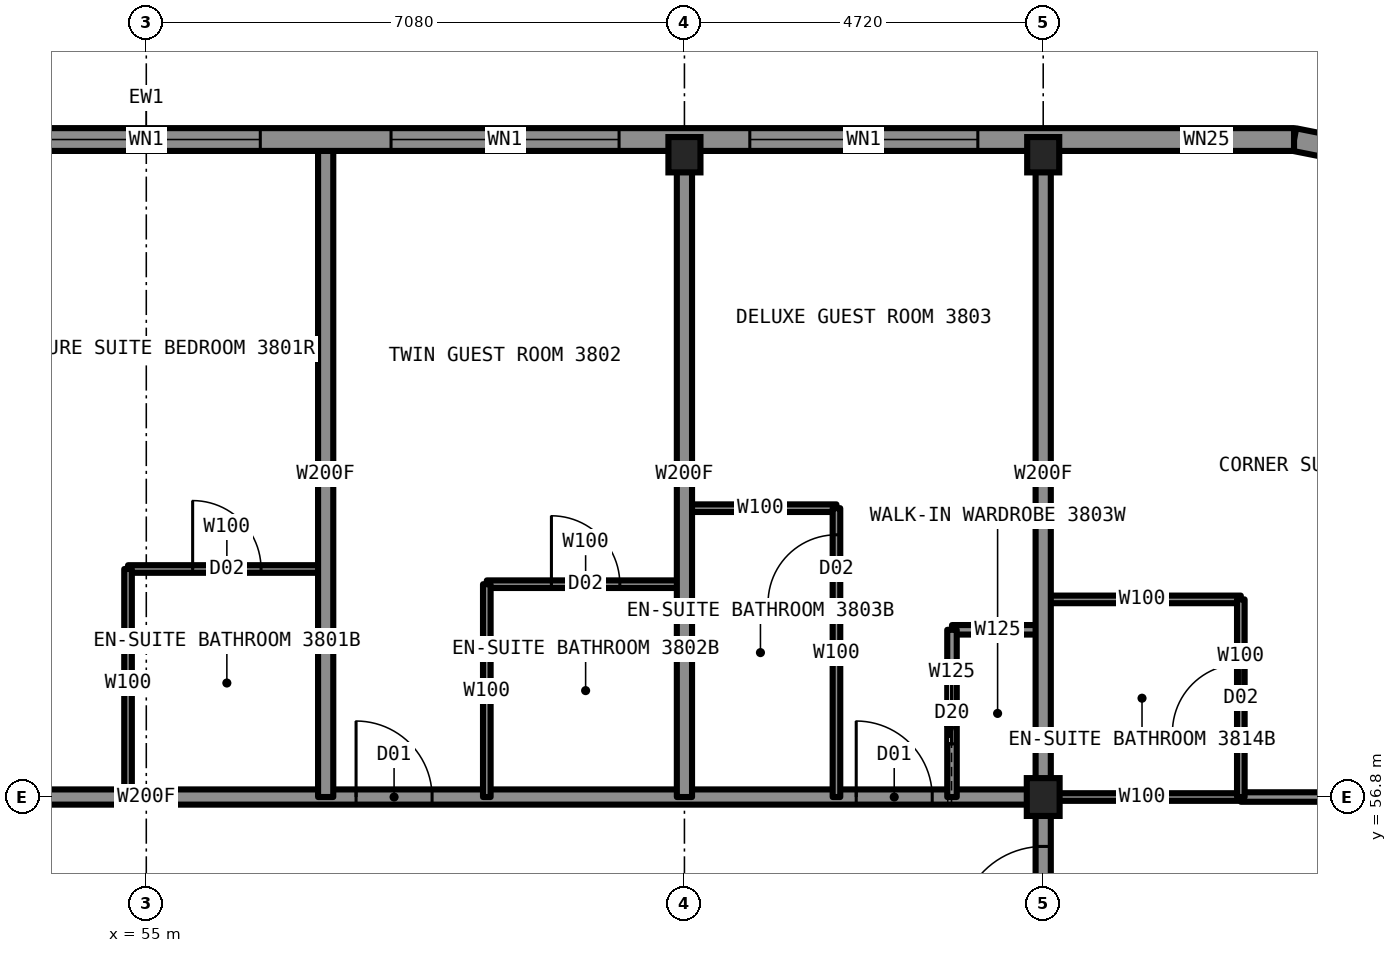
"""IFC4 building model, lengths in metres.
Left out: names, types, materials, properties, quantities, classifications, styles, units other than length and angle.
Written with IfcOpenShell. Run it as: python <this file> out.ifc"""

import sys

from ifc_helpers import new_model, si_unit, direction, frame, frame_2d, origin, origin_2d, place, context, subcontext, project, spatial, rectangle, i_section, extrude, element, fill, save


model = new_model("IFC4")
c1 = context("Model", 3, precision=1e-05, world=origin(), true_north=direction((0.0, 1.0)))
c2 = subcontext(c1, "Body", "Model", "MODEL_VIEW")
j1 = project(units=[si_unit("LENGTHUNIT", "METRE"), si_unit("PLANEANGLEUNIT", "RADIAN")], contexts=[c1])
p1 = place(None, origin())
s1 = spatial("IfcSite", under=j1, at=p1, CompositionType="ELEMENT")
p2 = place(p1, origin())
s2 = spatial("IfcBuilding", under=s1, at=p2, CompositionType="ELEMENT")
p3 = place(p2, frame((0.0, 0.0, 135.4)))
s3 = spatial("IfcBuildingStorey", under=s2, at=p3, CompositionType="ELEMENT", Elevation=135.4)
for number, where, z_axis, x_axis in (
    (1, (62.08, 65.25, 0.0), (0.0, 0.0, 1.0), (1.0, 0.0, 0.0)),
    (2, (66.8, 65.25, 0.0), (0.0, 0.0, 1.0), (1.0, 0.0, 0.0)),
):
    element("IfcColumn", number, at=place(p3, frame(where, z_axis=z_axis, x_axis=x_axis)), inside=s3, PredefinedType="COLUMN", context=c2, shape_type="SweptSolid", body=[
        extrude(i_section(OverallWidth=0.422, OverallDepth=0.465, WebThickness=0.045, FlangeThickness=0.073, at=origin_2d()), origin(), (0.0, 0.0, 1.0), 3.5),
    ])
p4 = place(p3, frame((66.8, 56.8, 0.0), z_axis=(0.0, 0.0, 1.0), x_axis=(1.0, 0.0, 0.0)))
e3 = element("IfcColumn", 3, at=p4, inside=s3, PredefinedType="COLUMN", context=c2, shape_type="SweptSolid", body=[
    extrude(i_section(OverallWidth=0.432, OverallDepth=0.498, WebThickness=0.056, FlangeThickness=0.089, at=origin_2d()), origin(), (0.0, 0.0, 1.0), 3.5),
])
p5 = place(p3, frame((66.8, 56.8, 0.0), z_axis=(0.0, 0.0, 1.0), x_axis=(1.0, 0.0, 0.0)))
e4 = element("IfcWall", 4, at=p5, inside=s3, PredefinedType="PARTITIONING", context=c2, shape_type="SweptSolid", body=[
    extrude(rectangle(XDim=2.6, YDim=0.1, at=frame_2d((1.3, 0.0))), origin(), (0.0, 0.0, 1.0), 2.573),
])
p6 = place(p3, frame((43.2, 56.8, 0.0), z_axis=(0.0, 0.0, 1.0), x_axis=(1.0, 0.0, 0.0)))
e5 = element("IfcWall", 5, at=p6, inside=s3, PredefinedType="PARTITIONING", context=c2, shape_type="SweptSolid", body=[
    extrude(rectangle(XDim=23.6, YDim=0.2, at=frame_2d((11.8, 0.0))), origin(), (0.0, 0.0, 1.0), 3.33),
])
p7 = place(p6, frame((1.85, 0.0, 0.0)))
e6 = element("IfcOpeningElement", 6, at=p7, cuts=e5, PredefinedType="OPENING", context=c2, shape_type="SweptSolid", body=[
    extrude(rectangle(XDim=1.1, YDim=2.2, at=frame_2d((0.55, 1.1))), frame((0.0, 0.11, 0.0), z_axis=(0.0, -1.0, 0.0), x_axis=(1.0, 0.0, 0.0)), (0.0, 0.0, 1.0), 0.22),
])
p8 = place(p6, frame((14.56, 0.0, 0.0)))
e7 = element("IfcOpeningElement", 7, at=p8, cuts=e5, PredefinedType="OPENING", context=c2, shape_type="SweptSolid", body=[
    extrude(rectangle(XDim=1.0, YDim=2.2, at=frame_2d((0.5, 1.1))), frame((0.0, 0.11, 0.0), z_axis=(0.0, -1.0, 0.0), x_axis=(1.0, 0.0, 0.0)), (0.0, 0.0, 1.0), 0.22),
])
p9 = place(p6, frame((21.14, 0.0, 0.0)))
e8 = element("IfcOpeningElement", 8, at=p9, cuts=e5, PredefinedType="OPENING", context=c2, shape_type="SweptSolid", body=[
    extrude(rectangle(XDim=1.0, YDim=2.2, at=frame_2d((0.5, 1.1))), frame((0.0, 0.11, 0.0), z_axis=(0.0, -1.0, 0.0), x_axis=(1.0, 0.0, 0.0)), (0.0, 0.0, 1.0), 0.22),
])
p10 = place(p3, frame((69.4, 56.8, 0.0), z_axis=(0.0, 0.0, 1.0), x_axis=(1.0, 0.0, 0.0)))
e9 = element("IfcWall", 9, at=p10, inside=s3, PredefinedType="PARTITIONING", context=c2, shape_type="SweptSolid", body=[
    extrude(rectangle(XDim=5.9, YDim=0.125, at=frame_2d((2.95, 0.0))), origin(), (0.0, 0.0, 1.0), 2.573),
])
p11 = place(p10, frame((1.15, 0.0, 0.0)))
e10 = element("IfcOpeningElement", 10, at=p11, cuts=e9, PredefinedType="OPENING", context=c2, shape_type="SweptSolid", body=[
    extrude(rectangle(XDim=0.9, YDim=2.2, at=frame_2d((0.45, 1.1))), frame((0.0, 0.073, 0.0), z_axis=(0.0, -1.0, 0.0), x_axis=(1.0, 0.0, 0.0)), (0.0, 0.0, 1.0), 0.145),
])
p12 = place(p3, frame((65.6, 59.0, 0.0), z_axis=(0.0, 0.0, 1.0), x_axis=(1.0, 0.0, 0.0)))
e11 = element("IfcWall", 11, at=p12, inside=s3, PredefinedType="PARTITIONING", context=c2, shape_type="SweptSolid", body=[
    extrude(rectangle(XDim=1.2, YDim=0.125, at=frame_2d((0.6, 0.0))), origin(), (0.0, 0.0, 1.0), 3.33),
])
p13 = place(p3, frame((66.8, 59.4, 0.0), z_axis=(0.0, 0.0, 1.0), x_axis=(1.0, 0.0, 0.0)))
e12 = element("IfcWall", 12, at=p13, inside=s3, PredefinedType="PARTITIONING", context=c2, shape_type="SweptSolid", body=[
    extrude(rectangle(XDim=2.6, YDim=0.1, at=frame_2d((1.3, 0.0))), origin(), (0.0, 0.0, 1.0), 3.33),
])
p14 = place(p3, frame((59.48, 59.6, 0.0), z_axis=(0.0, 0.0, 1.0), x_axis=(1.0, 0.0, 0.0)))
e13 = element("IfcWall", 13, at=p14, inside=s3, PredefinedType="PARTITIONING", context=c2, shape_type="SweptSolid", body=[
    extrude(rectangle(XDim=2.6, YDim=0.1, at=frame_2d((1.3, 0.0))), origin(), (0.0, 0.0, 1.0), 3.33),
])
p15 = place(p14, frame((0.85, 0.0, 0.0)))
e14 = element("IfcOpeningElement", 14, at=p15, cuts=e13, PredefinedType="OPENING", context=c2, shape_type="SweptSolid", body=[
    extrude(rectangle(XDim=0.9, YDim=2.1, at=frame_2d((0.45, 1.05))), frame((0.0, 0.06, 0.0), z_axis=(0.0, -1.0, 0.0), x_axis=(1.0, 0.0, 0.0)), (0.0, 0.0, 1.0), 0.12),
])
p16 = place(p3, frame((54.76, 59.8, 0.0), z_axis=(0.0, 0.0, 1.0), x_axis=(1.0, 0.0, 0.0)))
e15 = element("IfcWall", 15, at=p16, inside=s3, PredefinedType="PARTITIONING", context=c2, shape_type="SweptSolid", body=[
    extrude(rectangle(XDim=2.6, YDim=0.1, at=frame_2d((1.3, 0.0))), origin(), (0.0, 0.0, 1.0), 3.33),
])
p17 = place(p16, frame((0.85, 0.0, 0.0)))
e16 = element("IfcOpeningElement", 16, at=p17, cuts=e15, PredefinedType="OPENING", context=c2, shape_type="SweptSolid", body=[
    extrude(rectangle(XDim=0.9, YDim=2.1, at=frame_2d((0.45, 1.05))), frame((0.0, 0.06, 0.0), z_axis=(0.0, -1.0, 0.0), x_axis=(1.0, 0.0, 0.0)), (0.0, 0.0, 1.0), 0.12),
])
p18 = place(p3, frame((62.08, 60.6, 0.0), z_axis=(0.0, 0.0, 1.0), x_axis=(1.0, 0.0, 0.0)))
e17 = element("IfcWall", 17, at=p18, inside=s3, PredefinedType="PARTITIONING", context=c2, shape_type="SweptSolid", body=[
    extrude(rectangle(XDim=2.0, YDim=0.1, at=frame_2d((1.0, 0.0))), origin(), (0.0, 0.0, 1.0), 3.33),
])
p19 = place(p3, frame((54.76, 56.8, 0.0), z_axis=(0.0, 0.0, 1.0), x_axis=(0.0, 1.0, 0.0)))
e18 = element("IfcWall", 18, at=p19, inside=s3, PredefinedType="PARTITIONING", context=c2, shape_type="SweptSolid", body=[
    extrude(rectangle(XDim=3.0, YDim=0.1, at=frame_2d((1.5, 0.0))), origin(), (0.0, 0.0, 1.0), 3.33),
])
p20 = place(p3, frame((65.6, 56.8, 0.0), z_axis=(0.0, 0.0, 1.0), x_axis=(0.0, 1.0, 0.0)))
e19 = element("IfcWall", 19, at=p20, inside=s3, PredefinedType="PARTITIONING", context=c2, shape_type="SweptSolid", body=[
    extrude(rectangle(XDim=2.2, YDim=0.125, at=frame_2d((1.1, 0.0))), origin(), (0.0, 0.0, 1.0), 3.33),
])
p21 = place(p20, frame((0.7, 0.0, 0.0)))
e20 = element("IfcOpeningElement", 20, at=p21, cuts=e19, PredefinedType="OPENING", context=c2, shape_type="SweptSolid", body=[
    extrude(rectangle(XDim=0.8, YDim=2.1, at=frame_2d((0.4, 1.05))), frame((0.0, 0.073, 0.0), z_axis=(0.0, -1.0, 0.0), x_axis=(1.0, 0.0, 0.0)), (0.0, 0.0, 1.0), 0.145),
])
p22 = place(p3, frame((66.8, 33.2, 0.0), z_axis=(0.0, 0.0, 1.0), x_axis=(0.0, 1.0, 0.0)))
e21 = element("IfcWall", 21, at=p22, inside=s3, PredefinedType="PARTITIONING", context=c2, shape_type="SweptSolid", body=[
    extrude(rectangle(XDim=23.6, YDim=0.2, at=frame_2d((11.8, 0.0))), origin(), (0.0, 0.0, 1.0), 3.33),
])
p23 = place(p22, frame((7.27, 0.0, 0.0)))
e22 = element("IfcOpeningElement", 22, at=p23, cuts=e21, PredefinedType="OPENING", context=c2, shape_type="SweptSolid", body=[
    extrude(rectangle(XDim=1.0, YDim=2.2, at=frame_2d((0.5, 1.1))), frame((0.0, 0.11, 0.0), z_axis=(0.0, -1.0, 0.0), x_axis=(1.0, 0.0, 0.0)), (0.0, 0.0, 1.0), 0.22),
])
p24 = place(p22, frame((11.99, 0.0, 0.0)))
e23 = element("IfcOpeningElement", 23, at=p24, cuts=e21, PredefinedType="OPENING", context=c2, shape_type="SweptSolid", body=[
    extrude(rectangle(XDim=1.0, YDim=2.2, at=frame_2d((0.5, 1.1))), frame((0.0, 0.11, 0.0), z_axis=(0.0, -1.0, 0.0), x_axis=(1.0, 0.0, 0.0)), (0.0, 0.0, 1.0), 0.22),
])
p25 = place(p22, frame((17.31, 0.0, 0.0)))
e24 = element("IfcOpeningElement", 24, at=p25, cuts=e21, PredefinedType="OPENING", context=c2, shape_type="SweptSolid", body=[
    extrude(rectangle(XDim=1.0, YDim=2.2, at=frame_2d((0.5, 1.1))), frame((0.0, 0.11, 0.0), z_axis=(0.0, -1.0, 0.0), x_axis=(1.0, 0.0, 0.0)), (0.0, 0.0, 1.0), 0.22),
])
p26 = place(p22, frame((21.85, 0.0, 0.0)))
e25 = element("IfcOpeningElement", 25, at=p26, cuts=e21, PredefinedType="OPENING", context=c2, shape_type="SweptSolid", body=[
    extrude(rectangle(XDim=1.1, YDim=2.2, at=frame_2d((0.55, 1.1))), frame((0.0, 0.11, 0.0), z_axis=(0.0, -1.0, 0.0), x_axis=(1.0, 0.0, 0.0)), (0.0, 0.0, 1.0), 0.22),
])
p27 = place(p22, frame((0.65, 0.0, 0.0)))
e26 = element("IfcOpeningElement", 26, at=p27, cuts=e21, PredefinedType="OPENING", context=c2, shape_type="SweptSolid", body=[
    extrude(rectangle(XDim=1.1, YDim=2.2, at=frame_2d((0.55, 1.1))), frame((0.0, 0.11, 0.0), z_axis=(0.0, -1.0, 0.0), x_axis=(1.0, 0.0, 0.0)), (0.0, 0.0, 1.0), 0.22),
])
p28 = place(p3, frame((66.8, 56.8, 0.0), z_axis=(0.0, 0.0, 1.0), x_axis=(0.0, 1.0, 0.0)))
e27 = element("IfcWall", 27, at=p28, inside=s3, PredefinedType="PARTITIONING", context=c2, shape_type="SweptSolid", body=[
    extrude(rectangle(XDim=8.5, YDim=0.2, at=frame_2d((4.25, 0.0))), origin(), (0.0, 0.0, 1.0), 2.573),
])
p29 = place(p3, frame((69.4, 56.8, 0.0), z_axis=(0.0, 0.0, 1.0), x_axis=(0.0, 1.0, 0.0)))
e28 = element("IfcWall", 28, at=p29, inside=s3, PredefinedType="PARTITIONING", context=c2, shape_type="SweptSolid", body=[
    extrude(rectangle(XDim=2.6, YDim=0.1, at=frame_2d((1.3, 0.0))), origin(), (0.0, 0.0, 1.0), 3.33),
])
p30 = place(p29, frame((0.85, 0.0, 0.0)))
e29 = element("IfcOpeningElement", 29, at=p30, cuts=e28, PredefinedType="OPENING", context=c2, shape_type="SweptSolid", body=[
    extrude(rectangle(XDim=0.9, YDim=2.1, at=frame_2d((0.45, 1.05))), frame((0.0, 0.06, 0.0), z_axis=(0.0, -1.0, 0.0), x_axis=(1.0, 0.0, 0.0)), (0.0, 0.0, 1.0), 0.12),
])
p31 = place(p3, frame((57.36, 56.8, 0.0), z_axis=(0.0, 0.0, 1.0), x_axis=(0.0, 1.0, 0.0)))
e30 = element("IfcWall", 30, at=p31, inside=s3, PredefinedType="PARTITIONING", context=c2, shape_type="SweptSolid", body=[
    extrude(rectangle(XDim=8.5, YDim=0.2, at=frame_2d((4.25, 0.0))), origin(), (0.0, 0.0, 1.0), 3.33),
])
p32 = place(p3, frame((59.48, 56.8, 0.0), z_axis=(0.0, 0.0, 1.0), x_axis=(0.0, 1.0, 0.0)))
e31 = element("IfcWall", 31, at=p32, inside=s3, PredefinedType="PARTITIONING", context=c2, shape_type="SweptSolid", body=[
    extrude(rectangle(XDim=2.8, YDim=0.1, at=frame_2d((1.4, 0.0))), origin(), (0.0, 0.0, 1.0), 3.33),
])
p33 = place(p3, frame((62.08, 56.8, 0.0), z_axis=(0.0, 0.0, 1.0), x_axis=(0.0, 1.0, 0.0)))
e32 = element("IfcWall", 32, at=p33, inside=s3, PredefinedType="PARTITIONING", context=c2, shape_type="SweptSolid", body=[
    extrude(rectangle(XDim=8.5, YDim=0.2, at=frame_2d((4.25, 0.0))), origin(), (0.0, 0.0, 1.0), 2.573),
])
p34 = place(p3, frame((64.08, 56.8, 0.0), z_axis=(0.0, 0.0, 1.0), x_axis=(0.0, 1.0, 0.0)))
e33 = element("IfcWall", 33, at=p34, inside=s3, PredefinedType="PARTITIONING", context=c2, shape_type="SweptSolid", body=[
    extrude(rectangle(XDim=3.8, YDim=0.1, at=frame_2d((1.9, 0.0))), origin(), (0.0, 0.0, 1.0), 3.33),
])
p35 = place(p34, frame((2.55, 0.0, 0.0)))
e34 = element("IfcOpeningElement", 34, at=p35, cuts=e33, PredefinedType="OPENING", context=c2, shape_type="SweptSolid", body=[
    extrude(rectangle(XDim=0.9, YDim=2.1, at=frame_2d((0.45, 1.05))), frame((0.0, 0.06, 0.0), z_axis=(0.0, -1.0, 0.0), x_axis=(1.0, 0.0, 0.0)), (0.0, 0.0, 1.0), 0.12),
])
p36 = place(p3, frame((72.147, 65.043, 0.0), z_axis=(0.0, 0.0, 1.0), x_axis=(-0.980787050784, 0.195081421501, 0.0)))
e35 = element("IfcWall", 35, at=p36, inside=s3, PredefinedType="SOLIDWALL", context=c2, shape_type="SweptSolid", body=[
    extrude(rectangle(XDim=2.087, YDim=0.3, at=frame_2d((1.044, 0.0))), origin(), (0.0, 0.0, 1.0), 3.33),
])
p37 = place(p36, frame((0.444, 0.0, 0.5)))
e36 = element("IfcOpeningElement", 36, at=p37, cuts=e35, PredefinedType="OPENING", context=c2, shape_type="SweptSolid", body=[
    extrude(rectangle(XDim=1.2, YDim=2.0, at=frame_2d((0.6, 1.0))), frame((0.0, 0.16, 0.0), z_axis=(0.0, -1.0, 0.0), x_axis=(1.0, 0.0, 0.0)), (0.0, 0.0, 1.0), 0.32),
])
p38 = place(p3, frame((70.1, 65.45, 0.0), z_axis=(0.0, 0.0, 1.0), x_axis=(-1.0, 0.0, 0.0)))
e37 = element("IfcWall", 37, at=p38, inside=s3, PredefinedType="SOLIDWALL", context=c2, shape_type="SweptSolid", body=[
    extrude(rectangle(XDim=30.2, YDim=0.3, at=frame_2d((15.1, 0.0))), origin(), (0.0, 0.0, 1.0), 2.83),
])
p39 = place(p38, frame((0.85, 0.0, 0.5)))
e38 = element("IfcOpeningElement", 38, at=p39, cuts=e37, PredefinedType="OPENING", context=c2, shape_type="SweptSolid", body=[
    extrude(rectangle(XDim=1.6, YDim=2.0, at=frame_2d((0.8, 1.0))), frame((0.0, 0.16, 0.0), z_axis=(0.0, -1.0, 0.0), x_axis=(1.0, 0.0, 0.0)), (0.0, 0.0, 1.0), 0.32),
])
p40 = place(p38, frame((4.16, 0.0, 0.5)))
e39 = element("IfcOpeningElement", 39, at=p40, cuts=e37, PredefinedType="OPENING", context=c2, shape_type="SweptSolid", body=[
    extrude(rectangle(XDim=1.3, YDim=1.9, at=frame_2d((0.65, 0.95))), frame((0.0, 0.16, 0.0), z_axis=(0.0, -1.0, 0.0), x_axis=(1.0, 0.0, 0.0)), (0.0, 0.0, 1.0), 0.32),
])
p41 = place(p38, frame((8.88, 0.0, 0.5)))
e40 = element("IfcOpeningElement", 40, at=p41, cuts=e37, PredefinedType="OPENING", context=c2, shape_type="SweptSolid", body=[
    extrude(rectangle(XDim=3.0, YDim=2.0, at=frame_2d((1.5, 1.0))), frame((0.0, 0.16, 0.0), z_axis=(0.0, -1.0, 0.0), x_axis=(1.0, 0.0, 0.0)), (0.0, 0.0, 1.0), 0.32),
])
p42 = place(p38, frame((13.6, 0.0, 0.5)))
e41 = element("IfcOpeningElement", 41, at=p42, cuts=e37, PredefinedType="OPENING", context=c2, shape_type="SweptSolid", body=[
    extrude(rectangle(XDim=3.0, YDim=2.0, at=frame_2d((1.5, 1.0))), frame((0.0, 0.16, 0.0), z_axis=(0.0, -1.0, 0.0), x_axis=(1.0, 0.0, 0.0)), (0.0, 0.0, 1.0), 0.32),
])
p43 = place(p38, frame((18.32, 0.0, 0.5)))
e42 = element("IfcOpeningElement", 42, at=p43, cuts=e37, PredefinedType="OPENING", context=c2, shape_type="SweptSolid", body=[
    extrude(rectangle(XDim=3.0, YDim=2.0, at=frame_2d((1.5, 1.0))), frame((0.0, 0.16, 0.0), z_axis=(0.0, -1.0, 0.0), x_axis=(1.0, 0.0, 0.0)), (0.0, 0.0, 1.0), 0.32),
])
p44 = place(p38, frame((24.69, 0.0, 0.5)))
e43 = element("IfcOpeningElement", 43, at=p44, cuts=e37, PredefinedType="OPENING", context=c2, shape_type="SweptSolid", body=[
    extrude(rectangle(XDim=1.3, YDim=1.9, at=frame_2d((0.65, 0.95))), frame((0.0, 0.16, 0.0), z_axis=(0.0, -1.0, 0.0), x_axis=(1.0, 0.0, 0.0)), (0.0, 0.0, 1.0), 0.32),
])
p45 = place(p38, frame((27.75, 0.0, 0.5)))
e44 = element("IfcOpeningElement", 44, at=p45, cuts=e37, PredefinedType="OPENING", context=c2, shape_type="SweptSolid", body=[
    extrude(rectangle(XDim=1.6, YDim=2.0, at=frame_2d((0.8, 1.0))), frame((0.0, 0.16, 0.0), z_axis=(0.0, -1.0, 0.0), x_axis=(1.0, 0.0, 0.0)), (0.0, 0.0, 1.0), 0.32),
])
p46 = place(p38, frame((5.51, 0.0, 0.5)))
e45 = element("IfcOpeningElement", 45, at=p46, cuts=e37, PredefinedType="OPENING", context=c2, shape_type="SweptSolid", body=[
    extrude(rectangle(XDim=0.7, YDim=0.9, at=frame_2d((0.35, 0.45))), frame((0.0, 0.16, 0.0), z_axis=(0.0, -1.0, 0.0), x_axis=(1.0, 0.0, 0.0)), (0.0, 0.0, 1.0), 0.32),
])
p47 = place(p38, frame((23.99, 0.0, 0.5)))
e46 = element("IfcOpeningElement", 46, at=p47, cuts=e37, PredefinedType="OPENING", context=c2, shape_type="SweptSolid", body=[
    extrude(rectangle(XDim=0.7, YDim=0.9, at=frame_2d((0.35, 0.45))), frame((0.0, 0.16, 0.0), z_axis=(0.0, -1.0, 0.0), x_axis=(1.0, 0.0, 0.0)), (0.0, 0.0, 1.0), 0.32),
])
p48 = place(p17, origin())
e47 = element("IfcDoor", 47, at=p48, inside=s3, OperationType="SINGLE_SWING_RIGHT", PredefinedType="DOOR", context=c2, shape_type="SweptSolid", body=[
    extrude(rectangle(XDim=0.9, YDim=2.1, at=frame_2d((0.45, 1.05))), frame((0.0, 0.025, 0.0), z_axis=(0.0, -1.0, 0.0), x_axis=(1.0, 0.0, 0.0)), (0.0, 0.0, 1.0), 0.05),
])
fill(e16, e47)
p49 = place(p8, origin())
e48 = element("IfcDoor", 48, at=p49, inside=s3, OperationType="SINGLE_SWING_LEFT", PredefinedType="DOOR", context=c2, shape_type="SweptSolid", body=[
    extrude(rectangle(XDim=1.0, YDim=2.2, at=frame_2d((0.5, 1.1))), frame((0.0, 0.025, 0.0), z_axis=(0.0, -1.0, 0.0), x_axis=(1.0, 0.0, 0.0)), (0.0, 0.0, 1.0), 0.05),
])
fill(e7, e48)
p50 = place(p15, origin())
e49 = element("IfcDoor", 49, at=p50, inside=s3, OperationType="SINGLE_SWING_RIGHT", PredefinedType="DOOR", context=c2, shape_type="SweptSolid", body=[
    extrude(rectangle(XDim=0.9, YDim=2.1, at=frame_2d((0.45, 1.05))), frame((0.0, 0.025, 0.0), z_axis=(0.0, -1.0, 0.0), x_axis=(1.0, 0.0, 0.0)), (0.0, 0.0, 1.0), 0.05),
])
fill(e14, e49)
p51 = place(p9, origin())
e50 = element("IfcDoor", 50, at=p51, inside=s3, OperationType="SINGLE_SWING_LEFT", PredefinedType="DOOR", context=c2, shape_type="SweptSolid", body=[
    extrude(rectangle(XDim=1.0, YDim=2.2, at=frame_2d((0.5, 1.1))), frame((0.0, 0.025, 0.0), z_axis=(0.0, -1.0, 0.0), x_axis=(1.0, 0.0, 0.0)), (0.0, 0.0, 1.0), 0.05),
])
fill(e8, e50)
p52 = place(p35, origin())
e51 = element("IfcDoor", 51, at=p52, inside=s3, OperationType="SINGLE_SWING_RIGHT", PredefinedType="DOOR", context=c2, shape_type="SweptSolid", body=[
    extrude(rectangle(XDim=0.9, YDim=2.1, at=frame_2d((0.45, 1.05))), frame((0.0, 0.025, 0.0), z_axis=(0.0, -1.0, 0.0), x_axis=(1.0, 0.0, 0.0)), (0.0, 0.0, 1.0), 0.05),
])
fill(e34, e51)
p53 = place(p21, origin())
e52 = element("IfcDoor", 52, at=p53, inside=s3, OperationType="SLIDING_TO_LEFT", PredefinedType="DOOR", context=c2, shape_type="SweptSolid", body=[
    extrude(rectangle(XDim=0.8, YDim=2.1, at=frame_2d((0.4, 1.05))), frame((0.0, 0.025, 0.0), z_axis=(0.0, -1.0, 0.0), x_axis=(1.0, 0.0, 0.0)), (0.0, 0.0, 1.0), 0.05),
])
fill(e20, e52)
p54 = place(p26, origin())
e53 = element("IfcDoor", 53, at=p54, inside=s3, OperationType="SINGLE_SWING_LEFT", PredefinedType="DOOR", context=c2, shape_type="SweptSolid", body=[
    extrude(rectangle(XDim=1.1, YDim=2.2, at=frame_2d((0.55, 1.1))), frame((0.0, 0.025, 0.0), z_axis=(0.0, -1.0, 0.0), x_axis=(1.0, 0.0, 0.0)), (0.0, 0.0, 1.0), 0.05),
])
fill(e25, e53)
p55 = place(p30, origin())
e54 = element("IfcDoor", 54, at=p55, inside=s3, OperationType="SINGLE_SWING_RIGHT", PredefinedType="DOOR", context=c2, shape_type="SweptSolid", body=[
    extrude(rectangle(XDim=0.9, YDim=2.1, at=frame_2d((0.45, 1.05))), frame((0.0, 0.025, 0.0), z_axis=(0.0, -1.0, 0.0), x_axis=(1.0, 0.0, 0.0)), (0.0, 0.0, 1.0), 0.05),
])
fill(e29, e54)
p56 = place(p39, origin())
e55 = element("IfcWindow", 55, at=p56, inside=s3, PartitioningType="SINGLE_PANEL", PredefinedType="WINDOW", context=c2, shape_type="SweptSolid", body=[
    extrude(rectangle(XDim=1.6, YDim=2.0, at=frame_2d((0.8, 1.0))), frame((0.0, 0.03, 0.0), z_axis=(0.0, -1.0, 0.0), x_axis=(1.0, 0.0, 0.0)), (0.0, 0.0, 1.0), 0.06),
])
fill(e38, e55)
p57 = place(p40, origin())
e56 = element("IfcWindow", 56, at=p57, inside=s3, PartitioningType="SINGLE_PANEL", PredefinedType="WINDOW", context=c2, shape_type="SweptSolid", body=[
    extrude(rectangle(XDim=1.3, YDim=1.9, at=frame_2d((0.65, 0.95))), frame((0.0, 0.03, 0.0), z_axis=(0.0, -1.0, 0.0), x_axis=(1.0, 0.0, 0.0)), (0.0, 0.0, 1.0), 0.06),
])
fill(e39, e56)
p58 = place(p41, origin())
e57 = element("IfcWindow", 57, at=p58, inside=s3, PartitioningType="SINGLE_PANEL", PredefinedType="WINDOW", context=c2, shape_type="SweptSolid", body=[
    extrude(rectangle(XDim=3.0, YDim=2.0, at=frame_2d((1.5, 1.0))), frame((0.0, 0.03, 0.0), z_axis=(0.0, -1.0, 0.0), x_axis=(1.0, 0.0, 0.0)), (0.0, 0.0, 1.0), 0.06),
])
fill(e40, e57)
p59 = place(p42, origin())
e58 = element("IfcWindow", 58, at=p59, inside=s3, PartitioningType="SINGLE_PANEL", PredefinedType="WINDOW", context=c2, shape_type="SweptSolid", body=[
    extrude(rectangle(XDim=3.0, YDim=2.0, at=frame_2d((1.5, 1.0))), frame((0.0, 0.03, 0.0), z_axis=(0.0, -1.0, 0.0), x_axis=(1.0, 0.0, 0.0)), (0.0, 0.0, 1.0), 0.06),
])
fill(e41, e58)
p60 = place(p46, origin())
e59 = element("IfcWindow", 59, at=p60, inside=s3, PartitioningType="SINGLE_PANEL", PredefinedType="WINDOW", context=c2, shape_type="SweptSolid", body=[
    extrude(rectangle(XDim=0.7, YDim=0.9, at=frame_2d((0.35, 0.45))), frame((0.0, 0.03, 0.0), z_axis=(0.0, -1.0, 0.0), x_axis=(1.0, 0.0, 0.0)), (0.0, 0.0, 1.0), 0.06),
])
fill(e45, e59)
save(model, sys.argv[1])
